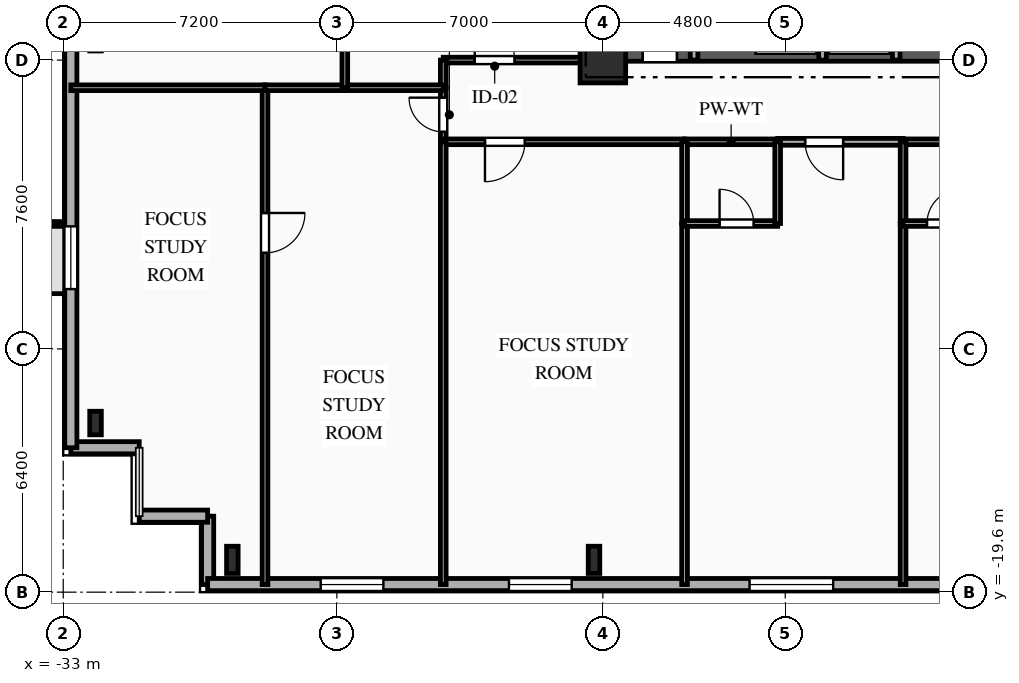
"""IFC4 building model, lengths in metres.
Left out: names, types, materials, properties, quantities, classifications, styles, units other than length and angle.
Written with IfcOpenShell. Run it as: python <this file> out.ifc"""

import sys

from ifc_helpers import new_model, si_unit, direction, frame, frame_2d, origin, origin_2d, place, context, subcontext, project, spatial, rectangle, i_section, extrude, element, fill, save


model = new_model("IFC4")
c1 = context("Model", 3, precision=1e-05, world=origin(), true_north=direction((0.0, 1.0)))
c2 = subcontext(c1, "Body", "Model", "MODEL_VIEW")
j1 = project(units=[si_unit("LENGTHUNIT", "METRE"), si_unit("PLANEANGLEUNIT", "RADIAN")], contexts=[c1])
p1 = place(None, origin())
s1 = spatial("IfcSite", under=j1, at=p1, CompositionType="ELEMENT")
p2 = place(p1, origin())
s2 = spatial("IfcBuilding", under=s1, at=p2, CompositionType="ELEMENT")
p3 = place(p2, frame((0.0, 0.0, 63.85)))
s3 = spatial("IfcBuildingStorey", under=s2, at=p3, CompositionType="ELEMENT", Elevation=63.85)
p4 = place(p3, frame((-18.8, -5.6, 0.0), z_axis=(0.0, 0.0, 1.0), x_axis=(1.0, 0.0, 0.0)))
e1 = element("IfcColumn", 1, at=p4, inside=s3, PredefinedType="COLUMN", context=c2, shape_type="SweptSolid", body=[
    extrude(rectangle(XDim=1.2, YDim=1.2, at=origin_2d()), origin(), (0.0, 0.0, 1.0), 3.35),
])
for number, where, z_axis, x_axis in (
    (2, (-28.55, -18.75, 0.0), (0.0, 0.0, 1.0), (1.0, 0.0, 0.0)),
    (3, (-19.033, -18.75, 0.0), (0.0, 0.0, 1.0), (1.0, 0.0, 0.0)),
):
    element("IfcColumn", number, at=place(p3, frame(where, z_axis=z_axis, x_axis=x_axis)), inside=s3, PredefinedType="COLUMN", context=c2, shape_type="SweptSolid", body=[
        extrude(i_section(OverallWidth=0.304, OverallDepth=0.716, WebThickness=0.021, FlangeThickness=0.04, FilletRadius=0.027, at=origin_2d()), origin(), (0.0, 0.0, 1.0), 3.35),
    ])
p5 = place(p3, frame((-32.15, -15.15, 0.0), z_axis=(0.0, 0.0, 1.0), x_axis=(1.0, 0.0, 0.0)))
e4 = element("IfcColumn", 4, at=p5, inside=s3, PredefinedType="COLUMN", context=c2, shape_type="SweptSolid", body=[
    extrude(i_section(OverallWidth=0.305, OverallDepth=0.62, WebThickness=0.021, FlangeThickness=0.04, FilletRadius=0.027, at=origin_2d()), origin(), (0.0, 0.0, 1.0), 3.35),
])
p6 = place(p3, frame((-29.2, -19.4, 0.0), z_axis=(0.0, 0.0, 1.0), x_axis=(0.0, 1.0, 0.0)))
e5 = element("IfcWall", 5, at=p6, inside=s3, PredefinedType="SOLIDWALL", context=c2, shape_type="SweptSolid", body=[
    extrude(rectangle(XDim=1.8, YDim=0.32, at=frame_2d((0.9, 0.0))), origin(), (0.0, 0.0, 1.0), 3.035),
])
for number, where, z_axis, x_axis in (
    (6, (-29.2, -17.6, 0.0), (0.0, 0.0, 1.0), (-1.0, 0.0, 0.0)),
    (7, (-31.0, -15.8, 0.0), (0.0, 0.0, 1.0), (-1.0, 0.0, 0.0)),
):
    element("IfcWall", number, at=place(p3, frame(where, z_axis=z_axis, x_axis=x_axis)), inside=s3, PredefinedType="SOLIDWALL", context=c2, shape_type="SweptSolid", body=[
        extrude(rectangle(XDim=1.8, YDim=0.32, at=frame_2d((0.9, 0.0))), origin(), (0.0, 0.0, 1.0), 3.035),
    ])
p7 = place(p3, frame((-32.8, -15.8, 0.0), z_axis=(0.0, 0.0, 1.0), x_axis=(0.0, 1.0, 0.0)))
e8 = element("IfcWall", 8, at=p7, inside=s3, PredefinedType="SOLIDWALL", context=c2, shape_type="SweptSolid", body=[
    extrude(rectangle(XDim=31.6, YDim=0.32, at=frame_2d((15.8, 0.0))), origin(), (0.0, 0.0, 1.0), 3.035),
])
p8 = place(p7, frame((4.175, 0.0, 0.85)))
e9 = element("IfcOpeningElement", 9, at=p8, cuts=e8, PredefinedType="OPENING", context=c2, shape_type="SweptSolid", body=[
    extrude(rectangle(XDim=1.65, YDim=1.85, at=frame_2d((0.825, 0.925))), frame((0.0, 0.17, 0.0), z_axis=(0.0, -1.0, 0.0), x_axis=(1.0, 0.0, 0.0)), (0.0, 0.0, 1.0), 0.34),
])
p9 = place(p7, frame((15.015, 0.0, 0.85)))
e10 = element("IfcOpeningElement", 10, at=p9, cuts=e8, PredefinedType="OPENING", context=c2, shape_type="SweptSolid", body=[
    extrude(rectangle(XDim=1.65, YDim=1.85, at=frame_2d((0.825, 0.925))), frame((0.0, 0.17, 0.0), z_axis=(0.0, -1.0, 0.0), x_axis=(1.0, 0.0, 0.0)), (0.0, 0.0, 1.0), 0.34),
])
p10 = place(p7, frame((25.855, 0.0, 0.85)))
e11 = element("IfcOpeningElement", 11, at=p10, cuts=e8, PredefinedType="OPENING", context=c2, shape_type="SweptSolid", body=[
    extrude(rectangle(XDim=1.65, YDim=1.85, at=frame_2d((0.825, 0.925))), frame((0.0, 0.17, 0.0), z_axis=(0.0, -1.0, 0.0), x_axis=(1.0, 0.0, 0.0)), (0.0, 0.0, 1.0), 0.34),
])
p11 = place(p3, frame((29.2, -19.4, 0.0), z_axis=(0.0, 0.0, 1.0), x_axis=(-1.0, 0.0, 0.0)))
e12 = element("IfcWall", 12, at=p11, inside=s3, PredefinedType="SOLIDWALL", context=c2, shape_type="SweptSolid", body=[
    extrude(rectangle(XDim=58.4, YDim=0.32, at=frame_2d((29.2, 0.0))), origin(), (0.0, 0.0, 1.0), 3.035),
])
p12 = place(p11, frame((2.535, 0.0, 0.85)))
e13 = element("IfcOpeningElement", 13, at=p12, cuts=e12, PredefinedType="OPENING", context=c2, shape_type="SweptSolid", body=[
    extrude(rectangle(XDim=1.65, YDim=1.85, at=frame_2d((0.825, 0.925))), frame((0.0, 0.17, 0.0), z_axis=(0.0, -1.0, 0.0), x_axis=(1.0, 0.0, 0.0)), (0.0, 0.0, 1.0), 0.34),
])
p13 = place(p11, frame((7.975, 0.0, 0.85)))
e14 = element("IfcOpeningElement", 14, at=p13, cuts=e12, PredefinedType="OPENING", context=c2, shape_type="SweptSolid", body=[
    extrude(rectangle(XDim=1.65, YDim=1.85, at=frame_2d((0.825, 0.925))), frame((0.0, 0.17, 0.0), z_axis=(0.0, -1.0, 0.0), x_axis=(1.0, 0.0, 0.0)), (0.0, 0.0, 1.0), 0.34),
])
p14 = place(p11, frame((13.14, 0.0, 0.85)))
e15 = element("IfcOpeningElement", 15, at=p14, cuts=e12, PredefinedType="OPENING", context=c2, shape_type="SweptSolid", body=[
    extrude(rectangle(XDim=2.2, YDim=1.85, at=frame_2d((1.1, 0.925))), frame((0.0, 0.17, 0.0), z_axis=(0.0, -1.0, 0.0), x_axis=(1.0, 0.0, 0.0)), (0.0, 0.0, 1.0), 0.34),
])
p15 = place(p11, frame((19.992, 0.0, 0.85)))
e16 = element("IfcOpeningElement", 16, at=p15, cuts=e12, PredefinedType="OPENING", context=c2, shape_type="SweptSolid", body=[
    extrude(rectangle(XDim=2.2, YDim=1.85, at=frame_2d((1.1, 0.925))), frame((0.0, 0.17, 0.0), z_axis=(0.0, -1.0, 0.0), x_axis=(1.0, 0.0, 0.0)), (0.0, 0.0, 1.0), 0.34),
])
p16 = place(p11, frame((24.66, 0.0, 0.85)))
e17 = element("IfcOpeningElement", 17, at=p16, cuts=e12, PredefinedType="OPENING", context=c2, shape_type="SweptSolid", body=[
    extrude(rectangle(XDim=2.2, YDim=1.85, at=frame_2d((1.1, 0.925))), frame((0.0, 0.17, 0.0), z_axis=(0.0, -1.0, 0.0), x_axis=(1.0, 0.0, 0.0)), (0.0, 0.0, 1.0), 0.34),
])
p17 = place(p11, frame((30.42, 0.0, 0.85)))
e18 = element("IfcOpeningElement", 18, at=p17, cuts=e12, PredefinedType="OPENING", context=c2, shape_type="SweptSolid", body=[
    extrude(rectangle(XDim=2.2, YDim=1.85, at=frame_2d((1.1, 0.925))), frame((0.0, 0.17, 0.0), z_axis=(0.0, -1.0, 0.0), x_axis=(1.0, 0.0, 0.0)), (0.0, 0.0, 1.0), 0.34),
])
p18 = place(p11, frame((36.18, 0.0, 0.85)))
e19 = element("IfcOpeningElement", 19, at=p18, cuts=e12, PredefinedType="OPENING", context=c2, shape_type="SweptSolid", body=[
    extrude(rectangle(XDim=2.2, YDim=1.85, at=frame_2d((1.1, 0.925))), frame((0.0, 0.17, 0.0), z_axis=(0.0, -1.0, 0.0), x_axis=(1.0, 0.0, 0.0)), (0.0, 0.0, 1.0), 0.34),
])
p19 = place(p11, frame((41.94, 0.0, 0.85)))
e20 = element("IfcOpeningElement", 20, at=p19, cuts=e12, PredefinedType="OPENING", context=c2, shape_type="SweptSolid", body=[
    extrude(rectangle(XDim=2.2, YDim=1.85, at=frame_2d((1.1, 0.925))), frame((0.0, 0.17, 0.0), z_axis=(0.0, -1.0, 0.0), x_axis=(1.0, 0.0, 0.0)), (0.0, 0.0, 1.0), 0.34),
])
p20 = place(p11, frame((48.821, 0.0, 0.85)))
e21 = element("IfcOpeningElement", 21, at=p20, cuts=e12, PredefinedType="OPENING", context=c2, shape_type="SweptSolid", body=[
    extrude(rectangle(XDim=1.65, YDim=1.85, at=frame_2d((0.825, 0.925))), frame((0.0, 0.17, 0.0), z_axis=(0.0, -1.0, 0.0), x_axis=(1.0, 0.0, 0.0)), (0.0, 0.0, 1.0), 0.34),
])
p21 = place(p11, frame((53.775, 0.0, 0.85)))
e22 = element("IfcOpeningElement", 22, at=p21, cuts=e12, PredefinedType="OPENING", context=c2, shape_type="SweptSolid", body=[
    extrude(rectangle(XDim=1.65, YDim=1.85, at=frame_2d((0.825, 0.925))), frame((0.0, 0.17, 0.0), z_axis=(0.0, -1.0, 0.0), x_axis=(1.0, 0.0, 0.0)), (0.0, 0.0, 1.0), 0.34),
])
p22 = place(p3, frame((-18.8, -5.35, 0.0), z_axis=(0.0, 0.0, 1.0), x_axis=(1.0, 0.0, 0.0)))
e23 = element("IfcWall", 23, at=p22, inside=s3, PredefinedType="SHEAR", context=c2, shape_type="SweptSolid", body=[
    extrude(rectangle(XDim=9.6, YDim=0.56, at=frame_2d((4.8, 0.0))), origin(), (0.0, 0.0, 1.0), 3.035),
])
p23 = place(p22, frame((1.05, 0.0, 0.0)))
e24 = element("IfcOpeningElement", 24, at=p23, cuts=e23, PredefinedType="OPENING", context=c2, shape_type="SweptSolid", body=[
    extrude(rectangle(XDim=0.9, YDim=2.1, at=frame_2d((0.45, 1.05))), frame((0.0, 0.29, 0.0), z_axis=(0.0, -1.0, 0.0), x_axis=(1.0, 0.0, 0.0)), (0.0, 0.0, 1.0), 0.58),
])
p24 = place(p3, frame((-16.4, -5.6, 0.0), z_axis=(0.0, 0.0, 1.0), x_axis=(0.0, 1.0, 0.0)))
e25 = element("IfcWall", 25, at=p24, inside=s3, PredefinedType="PARTITIONING", context=c2, shape_type="SweptSolid", body=[
    extrude(rectangle(XDim=3.49, YDim=0.2, at=frame_2d((1.745, 0.0))), origin(), (0.0, 0.0, 1.0), 3.035),
])
for number, where, z_axis, x_axis in (
    (26, (-13.02, -5.6, 0.0), (0.0, 0.0, 1.0), (0.0, 1.0, 0.0)),
    (27, (-11.08, -5.6, 0.0), (0.0, 0.0, 1.0), (0.0, 1.0, 0.0)),
):
    element("IfcWall", number, at=place(p3, frame(where, z_axis=z_axis, x_axis=x_axis)), inside=s3, PredefinedType="PARTITIONING", context=c2, shape_type="SweptSolid", body=[
        extrude(rectangle(XDim=2.25, YDim=0.2, at=frame_2d((1.125, 0.0))), origin(), (0.0, 0.0, 1.0), 3.035),
    ])
p25 = place(p3, frame((-23.0, -7.75, 0.0), z_axis=(0.0, 0.0, 1.0), x_axis=(0.0, 1.0, 0.0)))
e28 = element("IfcWall", 28, at=p25, inside=s3, PredefinedType="PARTITIONING", context=c2, shape_type="SweptSolid", body=[
    extrude(rectangle(XDim=1.423, YDim=0.15, at=frame_2d((0.711, 0.0))), origin(), (0.0, 0.0, 1.0), 3.035),
])
p26 = place(p25, frame((0.261, 0.0, 0.0)))
e29 = element("IfcOpeningElement", 29, at=p26, cuts=e28, PredefinedType="OPENING", context=c2, shape_type="SweptSolid", body=[
    extrude(rectangle(XDim=0.9, YDim=2.1, at=frame_2d((0.45, 1.05))), frame((0.0, 0.085, 0.0), z_axis=(0.0, -1.0, 0.0), x_axis=(1.0, 0.0, 0.0)), (0.0, 0.0, 1.0), 0.17),
])
p27 = place(p3, frame((-23.0, -5.6, 0.0), z_axis=(0.0, 0.0, 1.0), x_axis=(1.0, 0.0, 0.0)))
e30 = element("IfcWall", 30, at=p27, inside=s3, PredefinedType="PARTITIONING", context=c2, shape_type="SweptSolid", body=[
    extrude(rectangle(XDim=4.2, YDim=0.15, at=frame_2d((2.1, 0.0))), origin(), (0.0, 0.0, 1.0), 3.035),
])
p28 = place(p27, frame((0.829, 0.0, 0.0)))
e31 = element("IfcOpeningElement", 31, at=p28, cuts=e30, PredefinedType="OPENING", context=c2, shape_type="SweptSolid", body=[
    extrude(rectangle(XDim=1.05, YDim=2.15, at=frame_2d((0.525, 1.075))), frame((0.0, 0.085, 0.0), z_axis=(0.0, -1.0, 0.0), x_axis=(1.0, 0.0, 0.0)), (0.0, 0.0, 1.0), 0.17),
])
p29 = place(p3, frame((-23.0, -6.327, 0.0), z_axis=(0.0, 0.0, 1.0), x_axis=(0.0, 1.0, 0.0)))
e32 = element("IfcWall", 32, at=p29, inside=s3, PredefinedType="PARTITIONING", context=c2, shape_type="SweptSolid", body=[
    extrude(rectangle(XDim=0.727, YDim=0.15, at=frame_2d((0.363, 0.0))), origin(), (0.0, 0.0, 1.0), 3.035),
])
p30 = place(p3, frame((-16.65, -7.75, 0.0), z_axis=(0.0, 0.0, 1.0), x_axis=(-1.0, 0.0, 0.0)))
e33 = element("IfcWall", 33, at=p30, inside=s3, PredefinedType="PARTITIONING", context=c2, shape_type="SweptSolid", body=[
    extrude(rectangle(XDim=6.35, YDim=0.15, at=frame_2d((3.175, 0.0))), origin(), (0.0, 0.0, 1.0), 3.035),
])
p31 = place(p30, frame((4.202, 0.0, 0.0)))
e34 = element("IfcOpeningElement", 34, at=p31, cuts=e33, PredefinedType="OPENING", context=c2, shape_type="SweptSolid", body=[
    extrude(rectangle(XDim=1.05, YDim=2.15, at=frame_2d((0.525, 1.075))), frame((0.0, 0.085, 0.0), z_axis=(0.0, -1.0, 0.0), x_axis=(1.0, 0.0, 0.0)), (0.0, 0.0, 1.0), 0.17),
])
p32 = place(p3, frame((-10.9, -7.75, 0.0), z_axis=(0.0, 0.0, 1.0), x_axis=(-1.0, 0.0, 0.0)))
e35 = element("IfcWall", 35, at=p32, inside=s3, PredefinedType="PARTITIONING", context=c2, shape_type="SweptSolid", body=[
    extrude(rectangle(XDim=3.3, YDim=0.18, at=frame_2d((1.65, 0.0))), origin(), (0.0, 0.0, 1.0), 3.035),
])
p33 = place(p32, frame((1.577, 0.0, 0.0)))
e36 = element("IfcOpeningElement", 36, at=p33, cuts=e35, PredefinedType="OPENING", context=c2, shape_type="SweptSolid", body=[
    extrude(rectangle(XDim=1.0, YDim=2.15, at=frame_2d((0.5, 1.075))), frame((0.0, 0.1, 0.0), z_axis=(0.0, -1.0, 0.0), x_axis=(1.0, 0.0, 0.0)), (0.0, 0.0, 1.0), 0.2),
])
for number, where, z_axis, x_axis in (
    (37, (-14.2, -7.75, 0.0), (0.0, 0.0, 1.0), (-1.0, 0.0, 0.0)),
    (38, (-8.45, -7.75, 0.0), (0.0, 0.0, 1.0), (-1.0, 0.0, 0.0)),
):
    element("IfcWall", number, at=place(p3, frame(where, z_axis=z_axis, x_axis=x_axis)), inside=s3, PredefinedType="PLUMBINGWALL", context=c2, shape_type="SweptSolid", body=[
        extrude(rectangle(XDim=2.45, YDim=0.15, at=frame_2d((1.225, 0.0))), origin(), (0.0, 0.0, 1.0), 3.035),
    ])
p34 = place(p3, frame((-27.69, -6.327, 0.0), z_axis=(0.0, 0.0, 1.0), x_axis=(0.0, -1.0, 0.0)))
e39 = element("IfcWall", 39, at=p34, inside=s3, PredefinedType="PARTITIONING", context=c2, shape_type="SweptSolid", body=[
    extrude(rectangle(XDim=13.073, YDim=0.15, at=frame_2d((6.537, 0.0))), origin(), (0.0, 0.0, 1.0), 3.035),
])
p35 = place(p34, frame((3.296, 0.0, 0.0)))
e40 = element("IfcOpeningElement", 40, at=p35, cuts=e39, PredefinedType="OPENING", context=c2, shape_type="SweptSolid", body=[
    extrude(rectangle(XDim=1.05, YDim=2.15, at=frame_2d((0.525, 1.075))), frame((0.0, 0.085, 0.0), z_axis=(0.0, -1.0, 0.0), x_axis=(1.0, 0.0, 0.0)), (0.0, 0.0, 1.0), 0.17),
])
p36 = place(p3, frame((-32.8, -6.327, 0.0), z_axis=(0.0, 0.0, 1.0), x_axis=(1.0, 0.0, 0.0)))
e41 = element("IfcWall", 41, at=p36, inside=s3, PredefinedType="PARTITIONING", context=c2, shape_type="SweptSolid", body=[
    extrude(rectangle(XDim=5.11, YDim=0.15, at=frame_2d((2.555, 0.0))), origin(), (0.0, 0.0, 1.0), 3.035),
])
p37 = place(p3, frame((-27.69, -6.327, 0.0), z_axis=(0.0, 0.0, 1.0), x_axis=(1.0, 0.0, 0.0)))
e42 = element("IfcWall", 42, at=p37, inside=s3, PredefinedType="PARTITIONING", context=c2, shape_type="SweptSolid", body=[
    extrude(rectangle(XDim=2.1, YDim=0.15, at=frame_2d((1.05, 0.0))), origin(), (0.0, 0.0, 1.0), 3.035),
])
p38 = place(p3, frame((-25.59, -6.327, 0.0), z_axis=(0.0, 0.0, 1.0), x_axis=(1.0, 0.0, 0.0)))
e43 = element("IfcWall", 43, at=p38, inside=s3, PredefinedType="PARTITIONING", context=c2, shape_type="SweptSolid", body=[
    extrude(rectangle(XDim=2.59, YDim=0.15, at=frame_2d((1.295, 0.0))), origin(), (0.0, 0.0, 1.0), 3.035),
])
p39 = place(p3, frame((-23.0, -7.75, 0.0), z_axis=(0.0, 0.0, 1.0), x_axis=(0.0, -1.0, 0.0)))
e44 = element("IfcWall", 44, at=p39, inside=s3, PredefinedType="PARTITIONING", context=c2, shape_type="SweptSolid", body=[
    extrude(rectangle(XDim=11.65, YDim=0.15, at=frame_2d((5.825, 0.0))), origin(), (0.0, 0.0, 1.0), 3.035),
])
p40 = place(p3, frame((-25.59, 6.327, 0.0), z_axis=(0.0, 0.0, 1.0), x_axis=(0.0, -1.0, 0.0)))
e45 = element("IfcWall", 45, at=p40, inside=s3, PredefinedType="PARTITIONING", context=c2, shape_type="SweptSolid", body=[
    extrude(rectangle(XDim=12.654, YDim=0.15, at=frame_2d((6.327, 0.0))), origin(), (0.0, 0.0, 1.0), 2.69),
])
p41 = place(p40, frame((5.802, 0.0, 0.0)))
e46 = element("IfcOpeningElement", 46, at=p41, cuts=e45, PredefinedType="OPENING", context=c2, shape_type="SweptSolid", body=[
    extrude(rectangle(XDim=1.05, YDim=2.15, at=frame_2d((0.525, 1.075))), frame((0.0, 0.085, 0.0), z_axis=(0.0, -1.0, 0.0), x_axis=(1.0, 0.0, 0.0)), (0.0, 0.0, 1.0), 0.17),
])
p42 = place(p3, frame((-16.65, -9.9, 0.0), z_axis=(0.0, 0.0, 1.0), x_axis=(0.0, -1.0, 0.0)))
e47 = element("IfcWall", 47, at=p42, inside=s3, PredefinedType="PARTITIONING", context=c2, shape_type="SweptSolid", body=[
    extrude(rectangle(XDim=9.5, YDim=0.15, at=frame_2d((4.75, 0.0))), origin(), (0.0, 0.0, 1.0), 3.035),
])
p43 = place(p3, frame((-16.65, -7.75, 0.0), z_axis=(0.0, 0.0, 1.0), x_axis=(0.0, -1.0, 0.0)))
e48 = element("IfcWall", 48, at=p43, inside=s3, PredefinedType="PLUMBINGWALL", context=c2, shape_type="SweptSolid", body=[
    extrude(rectangle(XDim=2.15, YDim=0.15, at=frame_2d((1.075, 0.0))), origin(), (0.0, 0.0, 1.0), 3.035),
])
p44 = place(p3, frame((-16.65, -9.9, 0.0), z_axis=(0.0, 0.0, 1.0), x_axis=(1.0, 0.0, 0.0)))
e49 = element("IfcWall", 49, at=p44, inside=s3, PredefinedType="PLUMBINGWALL", context=c2, shape_type="SweptSolid", body=[
    extrude(rectangle(XDim=2.45, YDim=0.15, at=frame_2d((1.225, 0.0))), origin(), (0.0, 0.0, 1.0), 3.035),
])
p45 = place(p44, frame((0.921, 0.0, 0.0)))
e50 = element("IfcOpeningElement", 50, at=p45, cuts=e49, PredefinedType="OPENING", context=c2, shape_type="SweptSolid", body=[
    extrude(rectangle(XDim=0.9, YDim=2.1, at=frame_2d((0.45, 1.05))), frame((0.0, 0.085, 0.0), z_axis=(0.0, -1.0, 0.0), x_axis=(1.0, 0.0, 0.0)), (0.0, 0.0, 1.0), 0.17),
])
p46 = place(p3, frame((-14.2, -9.9, 0.0), z_axis=(0.0, 0.0, 1.0), x_axis=(0.0, 1.0, 0.0)))
e51 = element("IfcWall", 51, at=p46, inside=s3, PredefinedType="PLUMBINGWALL", context=c2, shape_type="SweptSolid", body=[
    extrude(rectangle(XDim=2.15, YDim=0.15, at=frame_2d((1.075, 0.0))), origin(), (0.0, 0.0, 1.0), 3.035),
])
p47 = place(p3, frame((-10.9, -9.9, 0.0), z_axis=(0.0, 0.0, 1.0), x_axis=(0.0, -1.0, 0.0)))
e52 = element("IfcWall", 52, at=p47, inside=s3, PredefinedType="PARTITIONING", context=c2, shape_type="SweptSolid", body=[
    extrude(rectangle(XDim=9.5, YDim=0.15, at=frame_2d((4.75, 0.0))), origin(), (0.0, 0.0, 1.0), 3.035),
])
p48 = place(p3, frame((-10.9, -7.75, 0.0), z_axis=(0.0, 0.0, 1.0), x_axis=(0.0, -1.0, 0.0)))
e53 = element("IfcWall", 53, at=p48, inside=s3, PredefinedType="PLUMBINGWALL", context=c2, shape_type="SweptSolid", body=[
    extrude(rectangle(XDim=2.15, YDim=0.15, at=frame_2d((1.075, 0.0))), origin(), (0.0, 0.0, 1.0), 3.035),
])
p49 = place(p3, frame((-10.9, -9.9, 0.0), z_axis=(0.0, 0.0, 1.0), x_axis=(1.0, 0.0, 0.0)))
e54 = element("IfcWall", 54, at=p49, inside=s3, PredefinedType="PLUMBINGWALL", context=c2, shape_type="SweptSolid", body=[
    extrude(rectangle(XDim=2.45, YDim=0.15, at=frame_2d((1.225, 0.0))), origin(), (0.0, 0.0, 1.0), 3.035),
])
p50 = place(p49, frame((0.629, 0.0, 0.0)))
e55 = element("IfcOpeningElement", 55, at=p50, cuts=e54, PredefinedType="OPENING", context=c2, shape_type="SweptSolid", body=[
    extrude(rectangle(XDim=0.9, YDim=2.1, at=frame_2d((0.45, 1.05))), frame((0.0, 0.085, 0.0), z_axis=(0.0, -1.0, 0.0), x_axis=(1.0, 0.0, 0.0)), (0.0, 0.0, 1.0), 0.17),
])
p51 = place(p8, origin())
e56 = element("IfcWindow", 56, at=p51, inside=s3, PartitioningType="SINGLE_PANEL", PredefinedType="WINDOW", context=c2, shape_type="SweptSolid", body=[
    extrude(rectangle(XDim=1.65, YDim=1.85, at=frame_2d((0.825, 0.925))), frame((0.0, 0.03, 0.0), z_axis=(0.0, -1.0, 0.0), x_axis=(1.0, 0.0, 0.0)), (0.0, 0.0, 1.0), 0.06),
])
fill(e9, e56)
p52 = place(p19, origin())
e57 = element("IfcWindow", 57, at=p52, inside=s3, PartitioningType="SINGLE_PANEL", PredefinedType="WINDOW", context=c2, shape_type="SweptSolid", body=[
    extrude(rectangle(XDim=2.2, YDim=1.85, at=frame_2d((1.1, 0.925))), frame((0.0, 0.03, 0.0), z_axis=(0.0, -1.0, 0.0), x_axis=(1.0, 0.0, 0.0)), (0.0, 0.0, 1.0), 0.06),
])
fill(e20, e57)
p53 = place(p20, origin())
e58 = element("IfcWindow", 58, at=p53, inside=s3, PartitioningType="SINGLE_PANEL", PredefinedType="WINDOW", context=c2, shape_type="SweptSolid", body=[
    extrude(rectangle(XDim=1.65, YDim=1.85, at=frame_2d((0.825, 0.925))), frame((0.0, 0.03, 0.0), z_axis=(0.0, -1.0, 0.0), x_axis=(1.0, 0.0, 0.0)), (0.0, 0.0, 1.0), 0.06),
])
fill(e21, e58)
p54 = place(p21, origin())
e59 = element("IfcWindow", 59, at=p54, inside=s3, PartitioningType="SINGLE_PANEL", PredefinedType="WINDOW", context=c2, shape_type="SweptSolid", body=[
    extrude(rectangle(XDim=1.65, YDim=1.85, at=frame_2d((0.825, 0.925))), frame((0.0, 0.03, 0.0), z_axis=(0.0, -1.0, 0.0), x_axis=(1.0, 0.0, 0.0)), (0.0, 0.0, 1.0), 0.06),
])
fill(e22, e59)
p55 = place(p26, origin())
e60 = element("IfcDoor", 60, at=p55, inside=s3, OperationType="SINGLE_SWING_RIGHT", PredefinedType="DOOR", context=c2, shape_type="SweptSolid", body=[
    extrude(rectangle(XDim=0.9, YDim=2.1, at=frame_2d((0.45, 1.05))), frame((0.0, 0.025, 0.0), z_axis=(0.0, -1.0, 0.0), x_axis=(1.0, 0.0, 0.0)), (0.0, 0.0, 1.0), 0.05),
])
fill(e29, e60)
p56 = place(p28, origin())
e61 = element("IfcDoor", 61, at=p56, inside=s3, OperationType="SINGLE_SWING_LEFT", PredefinedType="DOOR", context=c2, shape_type="SweptSolid", body=[
    extrude(rectangle(XDim=1.05, YDim=2.15, at=frame_2d((0.525, 1.075))), frame((0.0, 0.025, 0.0), z_axis=(0.0, -1.0, 0.0), x_axis=(1.0, 0.0, 0.0)), (0.0, 0.0, 1.0), 0.05),
])
fill(e31, e61)
p57 = place(p31, origin())
e62 = element("IfcDoor", 62, at=p57, inside=s3, OperationType="SINGLE_SWING_RIGHT", PredefinedType="DOOR", context=c2, shape_type="SweptSolid", body=[
    extrude(rectangle(XDim=1.05, YDim=2.15, at=frame_2d((0.525, 1.075))), frame((0.0, 0.025, 0.0), z_axis=(0.0, -1.0, 0.0), x_axis=(1.0, 0.0, 0.0)), (0.0, 0.0, 1.0), 0.05),
])
fill(e34, e62)
p58 = place(p33, origin())
e63 = element("IfcDoor", 63, at=p58, inside=s3, OperationType="SINGLE_SWING_LEFT", PredefinedType="DOOR", context=c2, shape_type="SweptSolid", body=[
    extrude(rectangle(XDim=1.0, YDim=2.15, at=frame_2d((0.5, 1.075))), frame((0.0, 0.025, 0.0), z_axis=(0.0, -1.0, 0.0), x_axis=(1.0, 0.0, 0.0)), (0.0, 0.0, 1.0), 0.05),
])
fill(e36, e63)
p59 = place(p35, origin())
e64 = element("IfcDoor", 64, at=p59, inside=s3, OperationType="SINGLE_SWING_LEFT", PredefinedType="DOOR", context=c2, shape_type="SweptSolid", body=[
    extrude(rectangle(XDim=1.05, YDim=2.15, at=frame_2d((0.525, 1.075))), frame((0.0, 0.025, 0.0), z_axis=(0.0, -1.0, 0.0), x_axis=(1.0, 0.0, 0.0)), (0.0, 0.0, 1.0), 0.05),
])
fill(e40, e64)
p60 = place(p45, origin())
e65 = element("IfcDoor", 65, at=p60, inside=s3, OperationType="SINGLE_SWING_LEFT", PredefinedType="DOOR", context=c2, shape_type="SweptSolid", body=[
    extrude(rectangle(XDim=0.9, YDim=2.1, at=frame_2d((0.45, 1.05))), frame((0.0, 0.025, 0.0), z_axis=(0.0, -1.0, 0.0), x_axis=(1.0, 0.0, 0.0)), (0.0, 0.0, 1.0), 0.05),
])
fill(e50, e65)
p61 = place(p50, origin())
e66 = element("IfcDoor", 66, at=p61, inside=s3, OperationType="SINGLE_SWING_RIGHT", PredefinedType="DOOR", context=c2, shape_type="SweptSolid", body=[
    extrude(rectangle(XDim=0.9, YDim=2.1, at=frame_2d((0.45, 1.05))), frame((0.0, 0.025, 0.0), z_axis=(0.0, -1.0, 0.0), x_axis=(1.0, 0.0, 0.0)), (0.0, 0.0, 1.0), 0.05),
])
fill(e55, e66)
save(model, sys.argv[1])
